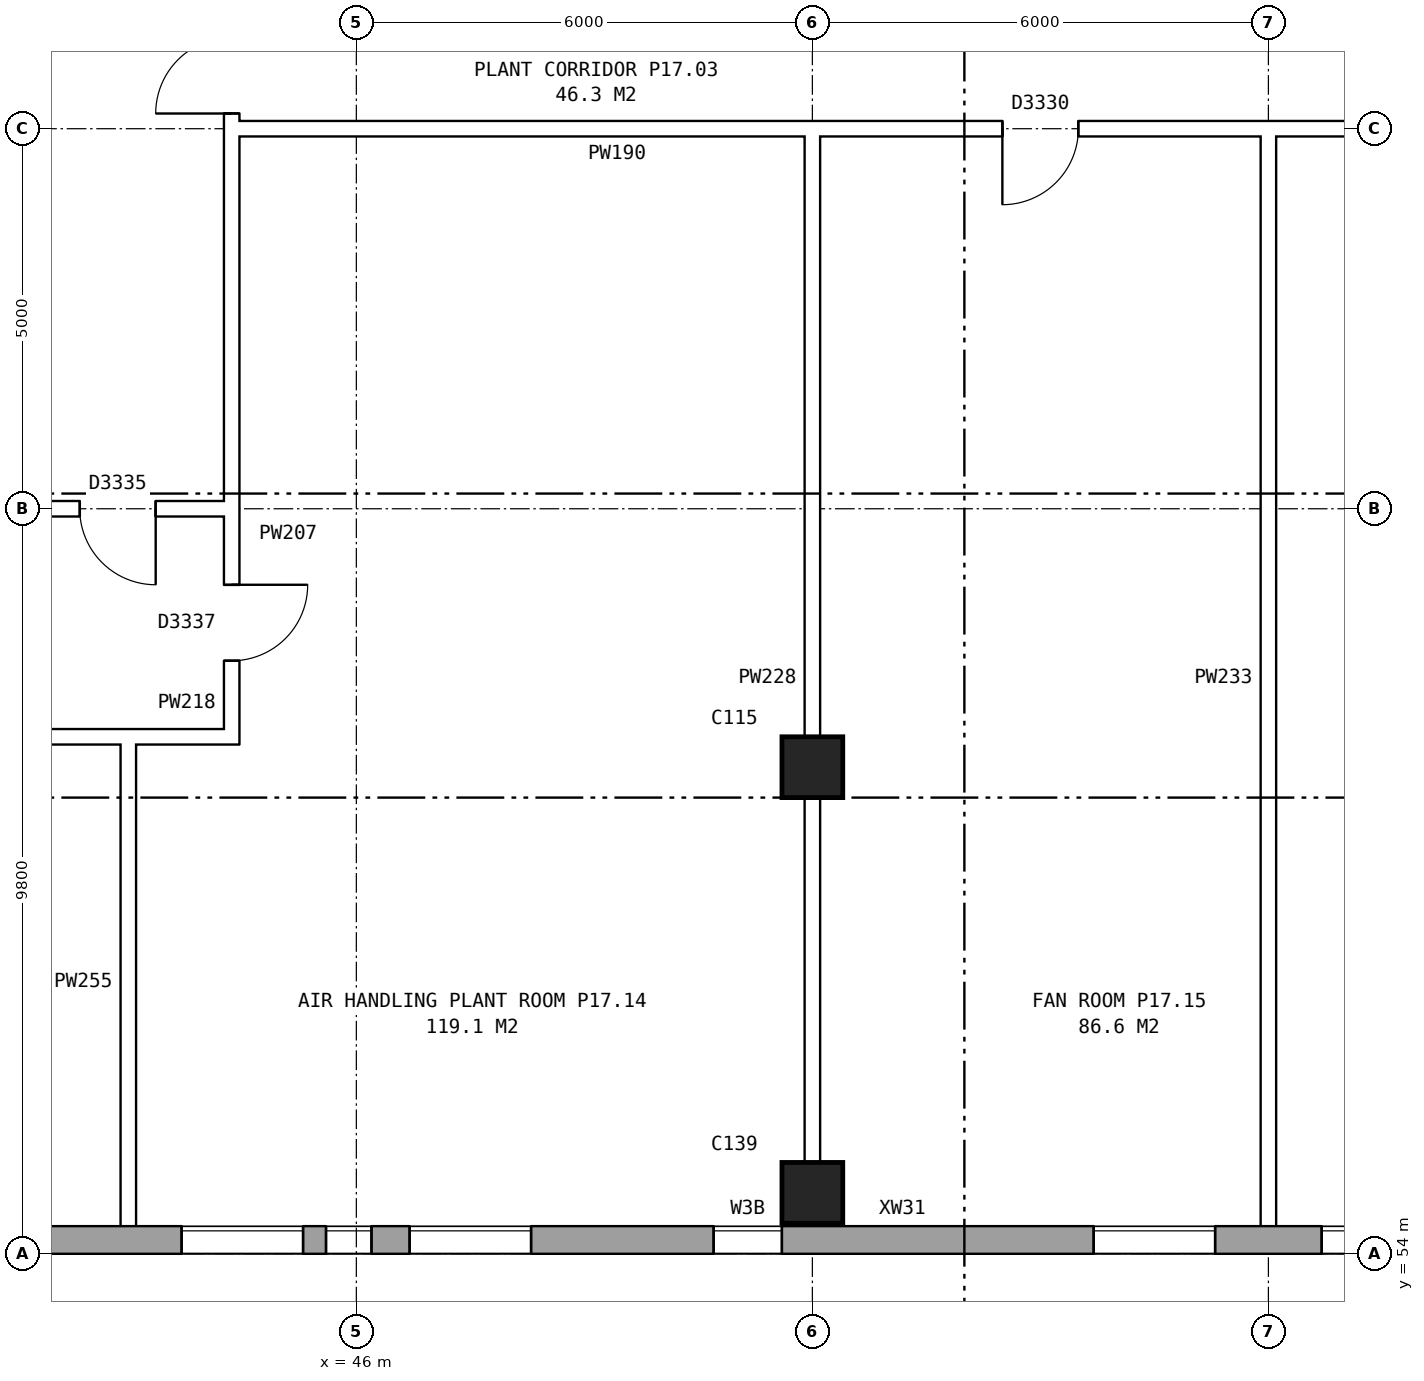
"""IFC4 building model, lengths in metres.
Left out: names, types, materials, properties, quantities, classifications, styles, units other than length and angle.
Written with IfcOpenShell. Run it as: python <this file> out.ifc"""

import sys

from ifc_helpers import new_model, si_unit, direction, frame, frame_2d, origin, origin_2d, place, context, subcontext, project, spatial, rectangle, extrude, element, fill, save


model = new_model("IFC4")
c1 = context("Model", 3, precision=1e-05, world=origin(), true_north=direction((0.0, 1.0)))
c2 = subcontext(c1, "Body", "Model", "MODEL_VIEW")
j1 = project(units=[si_unit("LENGTHUNIT", "METRE"), si_unit("PLANEANGLEUNIT", "RADIAN")], contexts=[c1])
p1 = place(None, origin())
s1 = spatial("IfcSite", under=j1, at=p1, CompositionType="ELEMENT")
p2 = place(p1, origin())
s2 = spatial("IfcBuilding", under=s1, at=p2, CompositionType="ELEMENT")
p3 = place(p2, frame((0.0, 0.0, 62.9)))
s3 = spatial("IfcBuildingStorey", under=s2, at=p3, CompositionType="ELEMENT", Elevation=62.9)
for number, where, z_axis, x_axis in (
    (1, (52.0, 54.8, 0.0), (0.0, 0.0, 1.0), (1.0, 0.0, 0.0)),
    (2, (52.0, 60.4, 0.0), (0.0, 0.0, 1.0), (1.0, 0.0, 0.0)),
):
    element("IfcColumn", number, at=place(p3, frame(where, z_axis=z_axis, x_axis=x_axis)), inside=s3, PredefinedType="COLUMN", context=c2, shape_type="SweptSolid", body=[
        extrude(rectangle(XDim=0.8, YDim=0.8, at=origin_2d()), origin(), (0.0, 0.0, 1.0), 4.2),
    ])
p4 = place(p3, frame((26.325, 54.18, 0.0), z_axis=(0.0, 0.0, 1.0), x_axis=(1.0, 0.0, 0.0)))
e3 = element("IfcWall", 3, at=p4, inside=s3, PredefinedType="STANDARD", context=c2, shape_type="SweptSolid", body=[
    extrude(rectangle(XDim=46.601, YDim=0.36, at=frame_2d((23.3, 0.0))), origin(), (0.0, 0.0, 1.0), 4.2),
])
p5 = place(p4, frame((0.6, 0.0, 1.5)))
e4 = element("IfcOpeningElement", 4, at=p5, cuts=e3, PredefinedType="OPENING", context=c2, shape_type="SweptSolid", body=[
    extrude(rectangle(XDim=0.6, YDim=1.2, at=frame_2d((0.3, 0.6))), frame((0.0, 0.19, 0.0), z_axis=(0.0, -1.0, 0.0), x_axis=(1.0, 0.0, 0.0)), (0.0, 0.0, 1.0), 0.38),
])
p6 = place(p4, frame((5.375, 0.0, 1.5)))
e5 = element("IfcOpeningElement", 5, at=p6, cuts=e3, PredefinedType="OPENING", context=c2, shape_type="SweptSolid", body=[
    extrude(rectangle(XDim=1.6, YDim=1.2, at=frame_2d((0.8, 0.6))), frame((0.0, 0.19, 0.0), z_axis=(0.0, -1.0, 0.0), x_axis=(1.0, 0.0, 0.0)), (0.0, 0.0, 1.0), 0.38),
])
p7 = place(p4, frame((8.375, 0.0, 1.5)))
e6 = element("IfcOpeningElement", 6, at=p7, cuts=e3, PredefinedType="OPENING", context=c2, shape_type="SweptSolid", body=[
    extrude(rectangle(XDim=1.6, YDim=1.2, at=frame_2d((0.8, 0.6))), frame((0.0, 0.19, 0.0), z_axis=(0.0, -1.0, 0.0), x_axis=(1.0, 0.0, 0.0)), (0.0, 0.0, 1.0), 0.38),
])
p8 = place(p4, frame((12.475, 0.0, 1.5)))
e7 = element("IfcOpeningElement", 7, at=p8, cuts=e3, PredefinedType="OPENING", context=c2, shape_type="SweptSolid", body=[
    extrude(rectangle(XDim=0.6, YDim=1.2, at=frame_2d((0.3, 0.6))), frame((0.0, 0.19, 0.0), z_axis=(0.0, -1.0, 0.0), x_axis=(1.0, 0.0, 0.0)), (0.0, 0.0, 1.0), 0.38),
])
p9 = place(p4, frame((13.375, 0.0, 1.5)))
e8 = element("IfcOpeningElement", 8, at=p9, cuts=e3, PredefinedType="OPENING", context=c2, shape_type="SweptSolid", body=[
    extrude(rectangle(XDim=1.2, YDim=1.2, at=frame_2d((0.6, 0.6))), frame((0.0, 0.19, 0.0), z_axis=(0.0, -1.0, 0.0), x_axis=(1.0, 0.0, 0.0)), (0.0, 0.0, 1.0), 0.38),
])
p10 = place(p4, frame((17.375, 0.0, 1.5)))
e9 = element("IfcOpeningElement", 9, at=p10, cuts=e3, PredefinedType="OPENING", context=c2, shape_type="SweptSolid", body=[
    extrude(rectangle(XDim=1.6, YDim=1.2, at=frame_2d((0.8, 0.6))), frame((0.0, 0.19, 0.0), z_axis=(0.0, -1.0, 0.0), x_axis=(1.0, 0.0, 0.0)), (0.0, 0.0, 1.0), 0.38),
])
p11 = place(p4, frame((20.375, 0.0, 1.5)))
e10 = element("IfcOpeningElement", 10, at=p11, cuts=e3, PredefinedType="OPENING", context=c2, shape_type="SweptSolid", body=[
    extrude(rectangle(XDim=1.6, YDim=1.2, at=frame_2d((0.8, 0.6))), frame((0.0, 0.19, 0.0), z_axis=(0.0, -1.0, 0.0), x_axis=(1.0, 0.0, 0.0)), (0.0, 0.0, 1.0), 0.38),
])
p12 = place(p4, frame((19.275, 0.0, 1.5)))
e11 = element("IfcOpeningElement", 11, at=p12, cuts=e3, PredefinedType="OPENING", context=c2, shape_type="SweptSolid", body=[
    extrude(rectangle(XDim=0.6, YDim=1.2, at=frame_2d((0.3, 0.6))), frame((0.0, 0.19, 0.0), z_axis=(0.0, -1.0, 0.0), x_axis=(1.0, 0.0, 0.0)), (0.0, 0.0, 1.0), 0.38),
])
p13 = place(p4, frame((29.375, 0.0, 1.5)))
e12 = element("IfcOpeningElement", 12, at=p13, cuts=e3, PredefinedType="OPENING", context=c2, shape_type="SweptSolid", body=[
    extrude(rectangle(XDim=1.6, YDim=1.2, at=frame_2d((0.8, 0.6))), frame((0.0, 0.19, 0.0), z_axis=(0.0, -1.0, 0.0), x_axis=(1.0, 0.0, 0.0)), (0.0, 0.0, 1.0), 0.38),
])
p14 = place(p4, frame((32.375, 0.0, 1.5)))
e13 = element("IfcOpeningElement", 13, at=p14, cuts=e3, PredefinedType="OPENING", context=c2, shape_type="SweptSolid", body=[
    extrude(rectangle(XDim=1.6, YDim=1.2, at=frame_2d((0.8, 0.6))), frame((0.0, 0.19, 0.0), z_axis=(0.0, -1.0, 0.0), x_axis=(1.0, 0.0, 0.0)), (0.0, 0.0, 1.0), 0.38),
])
p15 = place(p4, frame((36.225, 0.0, 1.5)))
e14 = element("IfcOpeningElement", 14, at=p15, cuts=e3, PredefinedType="OPENING", context=c2, shape_type="SweptSolid", body=[
    extrude(rectangle(XDim=1.2, YDim=1.2, at=frame_2d((0.6, 0.6))), frame((0.0, 0.19, 0.0), z_axis=(0.0, -1.0, 0.0), x_axis=(1.0, 0.0, 0.0)), (0.0, 0.0, 1.0), 0.38),
])
p16 = place(p4, frame((43.275, 0.0, 1.5)))
e15 = element("IfcOpeningElement", 15, at=p16, cuts=e3, PredefinedType="OPENING", context=c2, shape_type="SweptSolid", body=[
    extrude(rectangle(XDim=0.6, YDim=1.2, at=frame_2d((0.3, 0.6))), frame((0.0, 0.19, 0.0), z_axis=(0.0, -1.0, 0.0), x_axis=(1.0, 0.0, 0.0)), (0.0, 0.0, 1.0), 0.38),
])
p17 = place(p4, frame((41.375, 0.0, 1.5)))
e16 = element("IfcOpeningElement", 16, at=p17, cuts=e3, PredefinedType="OPENING", context=c2, shape_type="SweptSolid", body=[
    extrude(rectangle(XDim=1.6, YDim=1.2, at=frame_2d((0.8, 0.6))), frame((0.0, 0.19, 0.0), z_axis=(0.0, -1.0, 0.0), x_axis=(1.0, 0.0, 0.0)), (0.0, 0.0, 1.0), 0.38),
])
p18 = place(p4, frame((44.175, 0.0, 1.5)))
e17 = element("IfcOpeningElement", 17, at=p18, cuts=e3, PredefinedType="OPENING", context=c2, shape_type="SweptSolid", body=[
    extrude(rectangle(XDim=1.2, YDim=1.2, at=frame_2d((0.6, 0.6))), frame((0.0, 0.19, 0.0), z_axis=(0.0, -1.0, 0.0), x_axis=(1.0, 0.0, 0.0)), (0.0, 0.0, 1.0), 0.38),
])
p19 = place(p4, frame((1.5, 0.0, 1.5)))
e18 = element("IfcOpeningElement", 18, at=p19, cuts=e3, PredefinedType="OPENING", context=c2, shape_type="SweptSolid", body=[
    extrude(rectangle(XDim=1.2, YDim=1.2, at=frame_2d((0.6, 0.6))), frame((0.0, 0.19, 0.0), z_axis=(0.0, -1.0, 0.0), x_axis=(1.0, 0.0, 0.0)), (0.0, 0.0, 1.0), 0.38),
])
p20 = place(p4, frame((24.375, 0.0, 1.5)))
e19 = element("IfcOpeningElement", 19, at=p20, cuts=e3, PredefinedType="OPENING", context=c2, shape_type="SweptSolid", body=[
    extrude(rectangle(XDim=0.9, YDim=1.2, at=frame_2d((0.45, 0.6))), frame((0.0, 0.19, 0.0), z_axis=(0.0, -1.0, 0.0), x_axis=(1.0, 0.0, 0.0)), (0.0, 0.0, 1.0), 0.38),
])
p21 = place(p3, frame((44.36, 63.9, 0.0), z_axis=(0.0, 0.0, 1.0), x_axis=(0.0, 1.0, 0.0)))
e20 = element("IfcWall", 20, at=p21, inside=s3, PredefinedType="PARTITIONING", context=c2, shape_type="SweptSolid", body=[
    extrude(rectangle(XDim=12.2, YDim=0.2, at=frame_2d((6.1, 0.0))), origin(), (0.0, 0.0, 1.0), 4.2),
])
p22 = place(p21, frame((5.1, 0.0, 0.0)))
e21 = element("IfcOpeningElement", 21, at=p22, cuts=e20, PredefinedType="OPENING", context=c2, shape_type="SweptSolid", body=[
    extrude(rectangle(XDim=2.0, YDim=2.1, at=frame_2d((1.0, 1.05))), frame((0.0, 0.11, 0.0), z_axis=(0.0, -1.0, 0.0), x_axis=(1.0, 0.0, 0.0)), (0.0, 0.0, 1.0), 0.22),
])
p23 = place(p3, frame((23.49, 60.8, 0.0), z_axis=(0.0, 0.0, 1.0), x_axis=(1.0, 0.0, 0.0)))
e22 = element("IfcWall", 22, at=p23, inside=s3, PredefinedType="PARTITIONING", context=c2, shape_type="SweptSolid", body=[
    extrude(rectangle(XDim=20.97, YDim=0.2, at=frame_2d((10.485, 0.0))), origin(), (0.0, 0.0, 1.0), 4.2),
])
p24 = place(p23, frame((2.015, 0.0, 0.0)))
e23 = element("IfcOpeningElement", 23, at=p24, cuts=e22, PredefinedType="OPENING", context=c2, shape_type="SweptSolid", body=[
    extrude(rectangle(XDim=1.0, YDim=2.1, at=frame_2d((0.5, 1.05))), frame((0.0, 0.11, 0.0), z_axis=(0.0, -1.0, 0.0), x_axis=(1.0, 0.0, 0.0)), (0.0, 0.0, 1.0), 0.22),
])
p25 = place(p23, frame((10.01, 0.0, 0.0)))
e24 = element("IfcOpeningElement", 24, at=p25, cuts=e22, PredefinedType="OPENING", context=c2, shape_type="SweptSolid", body=[
    extrude(rectangle(XDim=1.0, YDim=2.1, at=frame_2d((0.5, 1.05))), frame((0.0, 0.11, 0.0), z_axis=(0.0, -1.0, 0.0), x_axis=(1.0, 0.0, 0.0)), (0.0, 0.0, 1.0), 0.22),
])
p26 = place(p23, frame((17.21, 0.0, 0.0)))
e25 = element("IfcOpeningElement", 25, at=p26, cuts=e22, PredefinedType="OPENING", context=c2, shape_type="SweptSolid", body=[
    extrude(rectangle(XDim=1.0, YDim=2.1, at=frame_2d((0.5, 1.05))), frame((0.0, 0.11, 0.0), z_axis=(0.0, -1.0, 0.0), x_axis=(1.0, 0.0, 0.0)), (0.0, 0.0, 1.0), 0.22),
])
p27 = place(p3, frame((41.36, 63.8, 0.0), z_axis=(0.0, 0.0, 1.0), x_axis=(1.0, 0.0, 0.0)))
e26 = element("IfcWall", 26, at=p27, inside=s3, PredefinedType="PARTITIONING", context=c2, shape_type="SweptSolid", body=[
    extrude(rectangle(XDim=3.1, YDim=0.2, at=frame_2d((1.55, 0.0))), origin(), (0.0, 0.0, 1.0), 4.2),
])
p28 = place(p27, frame((1.0, 0.0, 0.0)))
e27 = element("IfcOpeningElement", 27, at=p28, cuts=e26, PredefinedType="OPENING", context=c2, shape_type="SweptSolid", body=[
    extrude(rectangle(XDim=1.0, YDim=2.1, at=frame_2d((0.5, 1.05))), frame((0.0, 0.11, 0.0), z_axis=(0.0, -1.0, 0.0), x_axis=(1.0, 0.0, 0.0)), (0.0, 0.0, 1.0), 0.22),
])
p29 = place(p3, frame((44.36, 68.8, 0.0), z_axis=(0.0, 0.0, 1.0), x_axis=(1.0, 0.0, 0.0)))
e28 = element("IfcWall", 28, at=p29, inside=s3, PredefinedType="PARTITIONING", context=c2, shape_type="SweptSolid", body=[
    extrude(rectangle(XDim=19.28, YDim=0.2, at=frame_2d((9.64, 0.0))), origin(), (0.0, 0.0, 1.0), 4.2),
])
p30 = place(p29, frame((10.14, 0.0, 0.0)))
e29 = element("IfcOpeningElement", 29, at=p30, cuts=e28, PredefinedType="OPENING", context=c2, shape_type="SweptSolid", body=[
    extrude(rectangle(XDim=1.0, YDim=2.1, at=frame_2d((0.5, 1.05))), frame((0.0, 0.11, 0.0), z_axis=(0.0, -1.0, 0.0), x_axis=(1.0, 0.0, 0.0)), (0.0, 0.0, 1.0), 0.22),
])
p31 = place(p29, frame((15.96, 0.0, 0.0)))
e30 = element("IfcOpeningElement", 30, at=p31, cuts=e28, PredefinedType="OPENING", context=c2, shape_type="SweptSolid", body=[
    extrude(rectangle(XDim=1.0, YDim=2.1, at=frame_2d((0.5, 1.05))), frame((0.0, 0.11, 0.0), z_axis=(0.0, -1.0, 0.0), x_axis=(1.0, 0.0, 0.0)), (0.0, 0.0, 1.0), 0.22),
])
p32 = place(p3, frame((43.0, 54.24, 0.0), z_axis=(0.0, 0.0, 1.0), x_axis=(0.0, 1.0, 0.0)))
e31 = element("IfcWall", 31, at=p32, inside=s3, PredefinedType="PARTITIONING", context=c2, shape_type="SweptSolid", body=[
    extrude(rectangle(XDim=6.66, YDim=0.2, at=frame_2d((3.33, 0.0))), origin(), (0.0, 0.0, 1.0), 4.2),
])
p33 = place(p3, frame((44.36, 60.7, 0.0), z_axis=(0.0, 0.0, 1.0), x_axis=(0.0, 1.0, 0.0)))
e32 = element("IfcWall", 32, at=p33, inside=s3, PredefinedType="PARTITIONING", context=c2, shape_type="SweptSolid", body=[
    extrude(rectangle(XDim=3.2, YDim=0.2, at=frame_2d((1.6, 0.0))), origin(), (0.0, 0.0, 1.0), 4.2),
])
p34 = place(p33, frame((1.1, 0.0, 0.0)))
e33 = element("IfcOpeningElement", 33, at=p34, cuts=e32, PredefinedType="OPENING", context=c2, shape_type="SweptSolid", body=[
    extrude(rectangle(XDim=1.0, YDim=2.1, at=frame_2d((0.5, 1.05))), frame((0.0, 0.11, 0.0), z_axis=(0.0, -1.0, 0.0), x_axis=(1.0, 0.0, 0.0)), (0.0, 0.0, 1.0), 0.22),
])
for number, where, z_axis, x_axis in (
    (34, (52.0, 54.24, 0.0), (0.0, 0.0, 1.0), (0.0, 1.0, 0.0)),
    (35, (58.0, 54.24, 0.0), (0.0, 0.0, 1.0), (0.0, 1.0, 0.0)),
):
    element("IfcWall", number, at=place(p3, frame(where, z_axis=z_axis, x_axis=x_axis)), inside=s3, PredefinedType="PARTITIONING", context=c2, shape_type="SweptSolid", body=[
        extrude(rectangle(XDim=14.66, YDim=0.2, at=frame_2d((7.33, 0.0))), origin(), (0.0, 0.0, 1.0), 4.2),
    ])
p35 = place(p10, origin())
e36 = element("IfcWindow", 36, at=p35, inside=s3, PartitioningType="DOUBLE_PANEL_HORIZONTAL", PredefinedType="WINDOW", context=c2, shape_type="SweptSolid", body=[
    extrude(rectangle(XDim=1.6, YDim=1.2, at=frame_2d((0.8, 0.6))), frame((0.0, 0.15, 0.0), z_axis=(0.0, -1.0, 0.0), x_axis=(1.0, 0.0, 0.0)), (0.0, 0.0, 1.0), 0.06),
])
fill(e9, e36)
p36 = place(p11, origin())
e37 = element("IfcWindow", 37, at=p36, inside=s3, PartitioningType="DOUBLE_PANEL_HORIZONTAL", PredefinedType="WINDOW", context=c2, shape_type="SweptSolid", body=[
    extrude(rectangle(XDim=1.6, YDim=1.2, at=frame_2d((0.8, 0.6))), frame((0.0, 0.15, 0.0), z_axis=(0.0, -1.0, 0.0), x_axis=(1.0, 0.0, 0.0)), (0.0, 0.0, 1.0), 0.06),
])
fill(e10, e37)
p37 = place(p12, origin())
e38 = element("IfcWindow", 38, at=p37, inside=s3, PartitioningType="DOUBLE_PANEL_HORIZONTAL", PredefinedType="WINDOW", context=c2, shape_type="SweptSolid", body=[
    extrude(rectangle(XDim=0.6, YDim=1.2, at=frame_2d((0.3, 0.6))), frame((0.0, 0.15, 0.0), z_axis=(0.0, -1.0, 0.0), x_axis=(1.0, 0.0, 0.0)), (0.0, 0.0, 1.0), 0.06),
])
fill(e11, e38)
p38 = place(p13, origin())
e39 = element("IfcWindow", 39, at=p38, inside=s3, PartitioningType="DOUBLE_PANEL_HORIZONTAL", PredefinedType="WINDOW", context=c2, shape_type="SweptSolid", body=[
    extrude(rectangle(XDim=1.6, YDim=1.2, at=frame_2d((0.8, 0.6))), frame((0.0, 0.15, 0.0), z_axis=(0.0, -1.0, 0.0), x_axis=(1.0, 0.0, 0.0)), (0.0, 0.0, 1.0), 0.06),
])
fill(e12, e39)
p39 = place(p14, origin())
e40 = element("IfcWindow", 40, at=p39, inside=s3, PartitioningType="DOUBLE_PANEL_HORIZONTAL", PredefinedType="WINDOW", context=c2, shape_type="SweptSolid", body=[
    extrude(rectangle(XDim=1.6, YDim=1.2, at=frame_2d((0.8, 0.6))), frame((0.0, 0.15, 0.0), z_axis=(0.0, -1.0, 0.0), x_axis=(1.0, 0.0, 0.0)), (0.0, 0.0, 1.0), 0.06),
])
fill(e13, e40)
p40 = place(p22, origin())
e41 = element("IfcDoor", 41, at=p40, inside=s3, OperationType="DOUBLE_DOOR_SINGLE_SWING", PredefinedType="DOOR", context=c2, shape_type="SweptSolid", body=[
    extrude(rectangle(XDim=2.0, YDim=2.1, at=frame_2d((1.0, 1.05))), frame((0.0, 0.025, 0.0), z_axis=(0.0, -1.0, 0.0), x_axis=(1.0, 0.0, 0.0)), (0.0, 0.0, 1.0), 0.05),
])
fill(e21, e41)
p41 = place(p28, frame((1.0, 0.0, 0.0), z_axis=(0.0, 0.0, 1.0), x_axis=(-1.0, 0.0, 0.0)))
e42 = element("IfcDoor", 42, at=p41, inside=s3, OperationType="SINGLE_SWING_LEFT", PredefinedType="DOOR", context=c2, shape_type="SweptSolid", body=[
    extrude(rectangle(XDim=1.0, YDim=2.1, at=frame_2d((0.5, 1.05))), frame((0.0, 0.025, 0.0), z_axis=(0.0, -1.0, 0.0), x_axis=(1.0, 0.0, 0.0)), (0.0, 0.0, 1.0), 0.05),
])
fill(e27, e42)
p42 = place(p30, frame((1.0, 0.0, 0.0), z_axis=(0.0, 0.0, 1.0), x_axis=(-1.0, 0.0, 0.0)))
e43 = element("IfcDoor", 43, at=p42, inside=s3, OperationType="SINGLE_SWING_RIGHT", PredefinedType="DOOR", context=c2, shape_type="SweptSolid", body=[
    extrude(rectangle(XDim=1.0, YDim=2.1, at=frame_2d((0.5, 1.05))), frame((0.0, 0.025, 0.0), z_axis=(0.0, -1.0, 0.0), x_axis=(1.0, 0.0, 0.0)), (0.0, 0.0, 1.0), 0.05),
])
fill(e29, e43)
p43 = place(p34, frame((1.0, 0.0, 0.0), z_axis=(0.0, 0.0, 1.0), x_axis=(-1.0, 0.0, 0.0)))
e44 = element("IfcDoor", 44, at=p43, inside=s3, OperationType="SINGLE_SWING_LEFT", PredefinedType="DOOR", context=c2, shape_type="SweptSolid", body=[
    extrude(rectangle(XDim=1.0, YDim=2.1, at=frame_2d((0.5, 1.05))), frame((0.0, 0.025, 0.0), z_axis=(0.0, -1.0, 0.0), x_axis=(1.0, 0.0, 0.0)), (0.0, 0.0, 1.0), 0.05),
])
fill(e33, e44)
p44 = place(p20, origin())
e45 = element("IfcWindow", 45, at=p44, inside=s3, PartitioningType="DOUBLE_PANEL_HORIZONTAL", PredefinedType="WINDOW", context=c2, shape_type="SweptSolid", body=[
    extrude(rectangle(XDim=0.9, YDim=1.2, at=frame_2d((0.45, 0.6))), frame((0.0, 0.15, 0.0), z_axis=(0.0, -1.0, 0.0), x_axis=(1.0, 0.0, 0.0)), (0.0, 0.0, 1.0), 0.06),
])
fill(e19, e45)
save(model, sys.argv[1])
